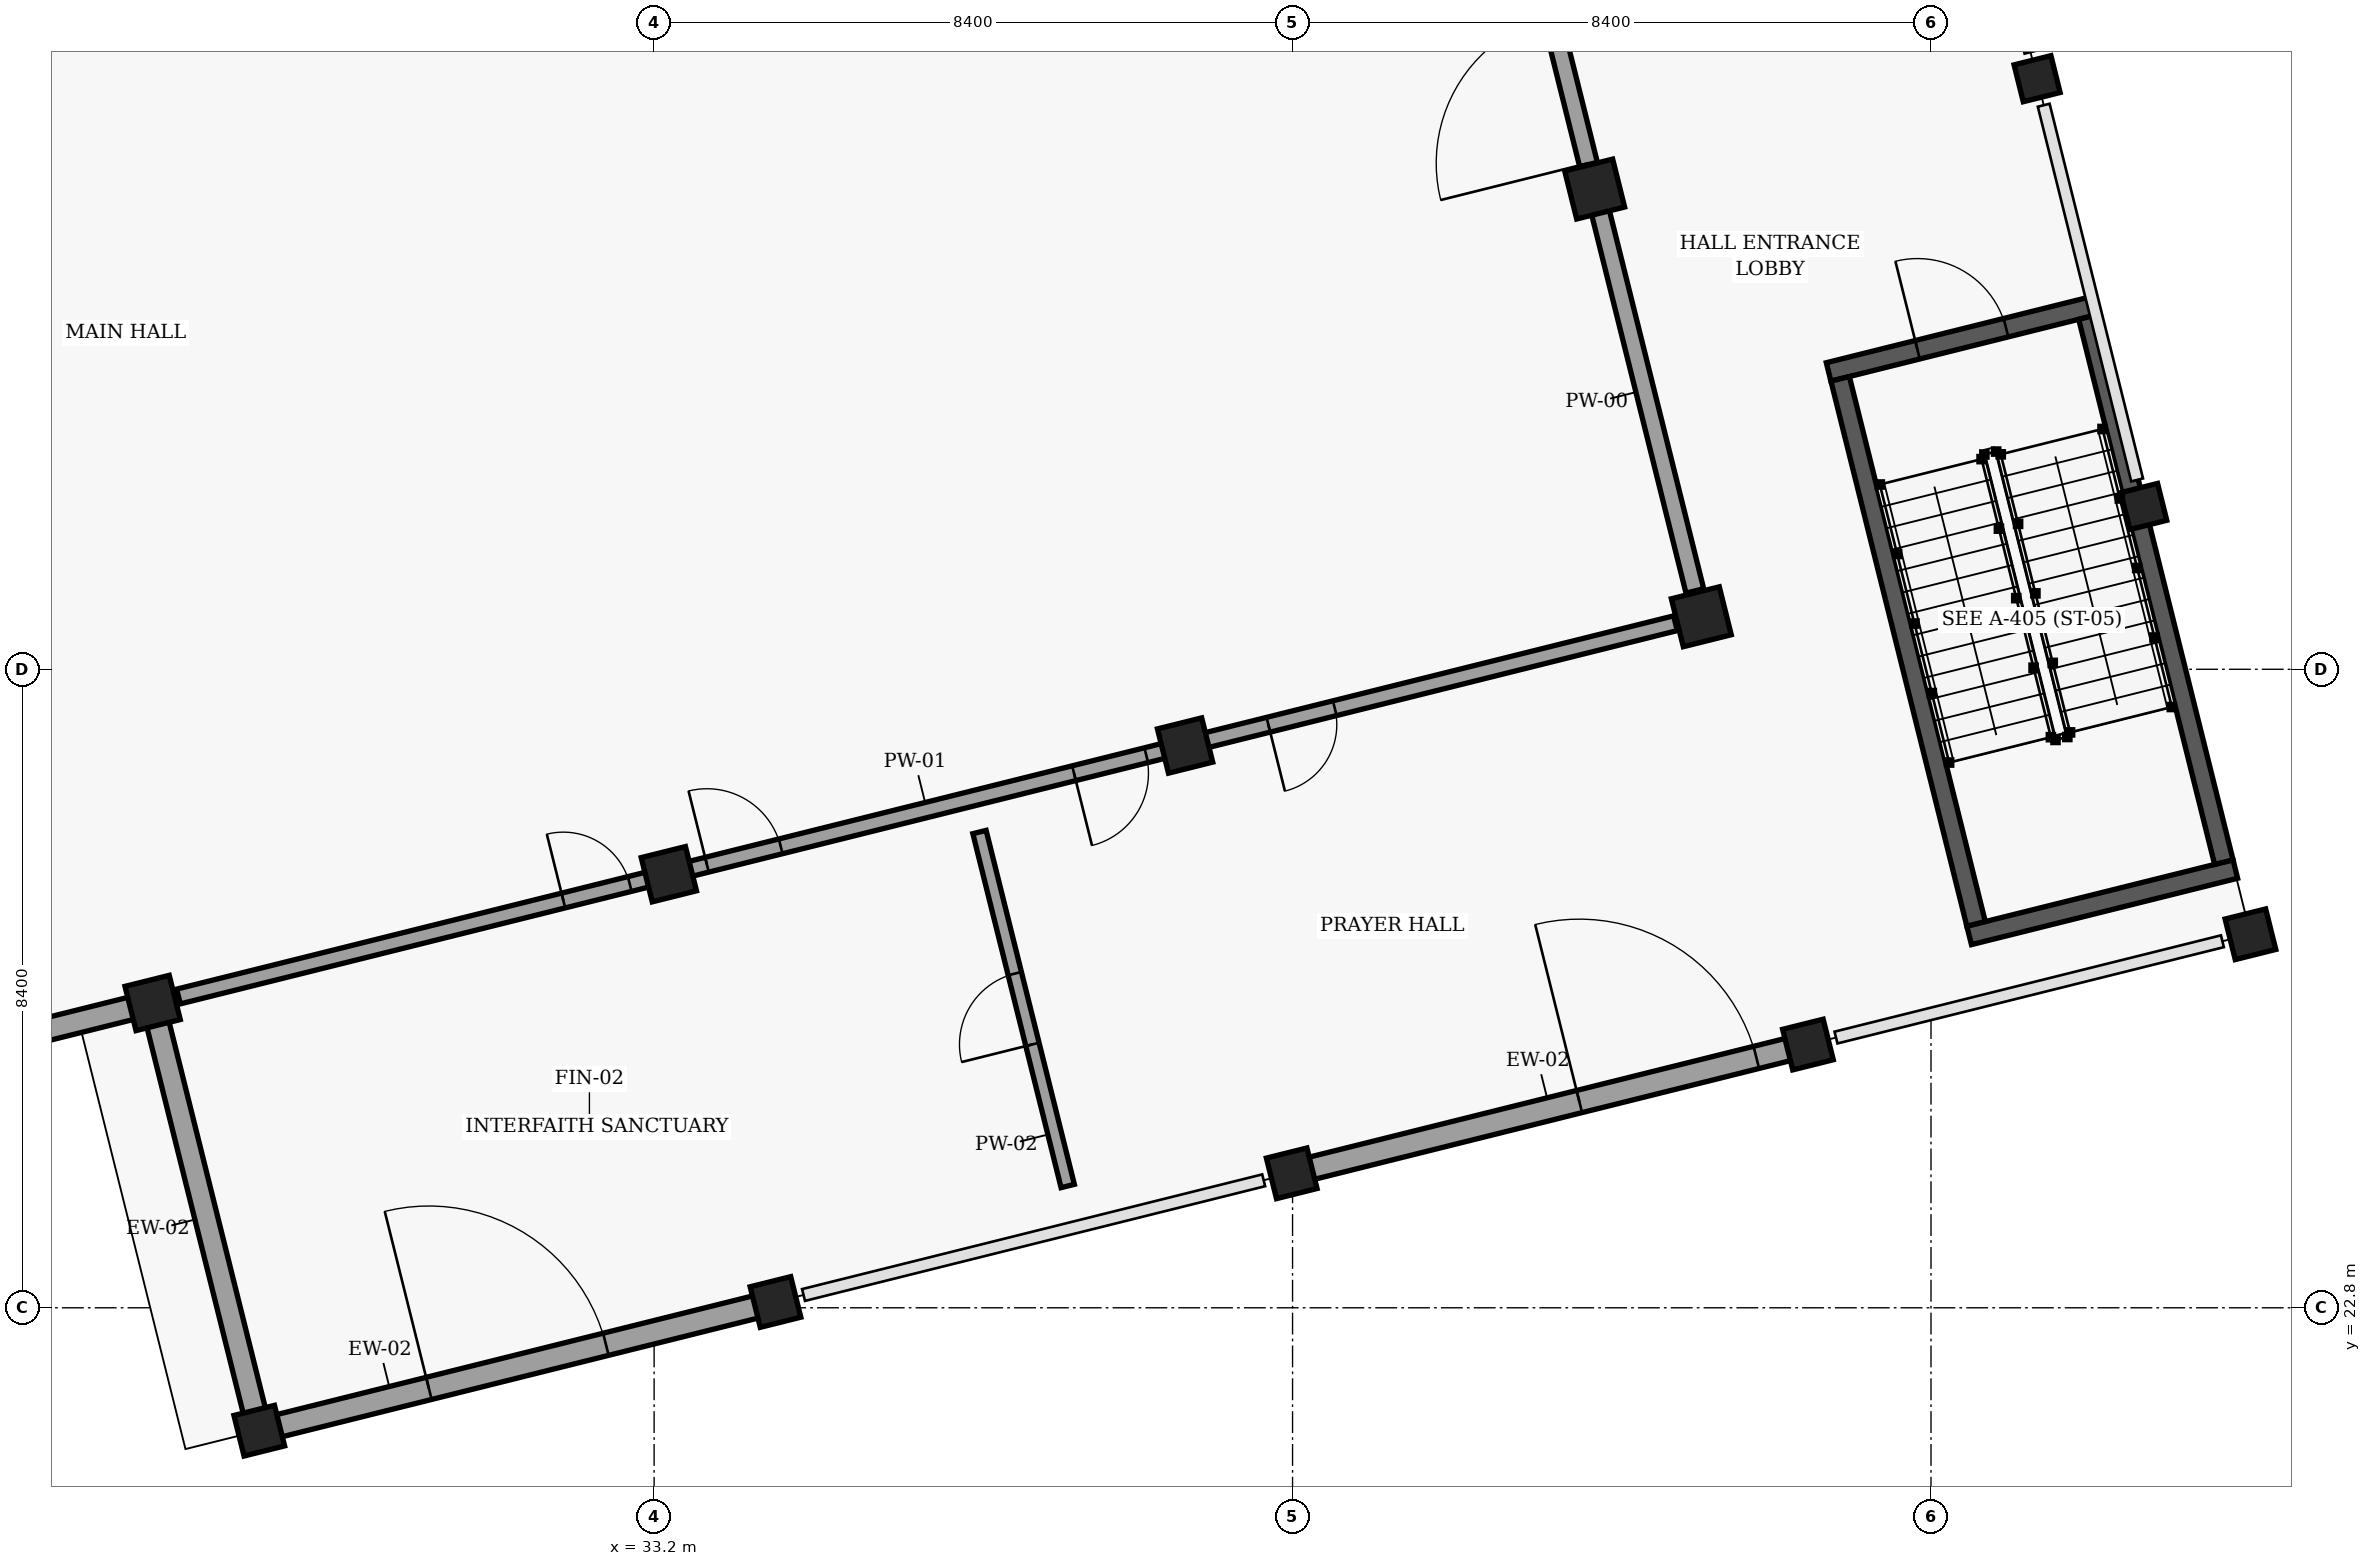
"""IFC4 building model, lengths in metres.
Left out: names, types, materials, properties, quantities, classifications, styles, units other than length and angle.
Written with IfcOpenShell. Run it as: python <this file> out.ifc"""

import sys

from ifc_helpers import new_model, si_unit, direction, frame, frame_2d, origin, origin_2d, place, context, subcontext, project, spatial, rectangle, extrude, element, fill, save


model = new_model("IFC4")
c1 = context("Model", 3, precision=1e-05, world=origin(), true_north=direction((0.0, 1.0)))
c2 = subcontext(c1, "Body", "Model", "MODEL_VIEW")
j1 = project(units=[si_unit("LENGTHUNIT", "METRE"), si_unit("PLANEANGLEUNIT", "RADIAN")], contexts=[c1])
p1 = place(None, origin())
s1 = spatial("IfcSite", under=j1, at=p1, CompositionType="ELEMENT")
p2 = place(p1, origin())
s2 = spatial("IfcBuilding", under=s1, at=p2, CompositionType="ELEMENT")
p3 = place(p2, origin())
s3 = spatial("IfcBuildingStorey", under=s2, at=p3, CompositionType="ELEMENT", Elevation=0.0)
for number, where, z_axis, x_axis in (
    (1, (46.978, 31.891, 0.0), (0.0, 0.0, 1.0), (0.97, 0.242, 0.0)),
    (2, (45.575, 37.518, 0.0), (0.0, 0.0, 1.0), (0.97, 0.242, 0.0)),
):
    element("IfcColumn", number, at=place(p3, frame(where, z_axis=z_axis, x_axis=x_axis)), inside=s3, PredefinedType="COLUMN", context=c2, shape_type="SweptSolid", body=[
        extrude(rectangle(XDim=0.65, YDim=0.65, at=origin_2d()), origin(), (0.0, 0.0, 1.0), 4.8),
    ])
for number, where, z_axis, x_axis in (
    (3, (52.799, 33.342, 0.0), (0.0, 0.0, 1.0), (0.97, 0.242, 0.0)),
    (4, (51.396, 38.97, 0.0), (0.0, 0.0, 1.0), (0.97, 0.242, 0.0)),
):
    element("IfcColumn", number, at=place(p3, frame(where, z_axis=z_axis, x_axis=x_axis)), inside=s3, PredefinedType="COLUMN", context=c2, shape_type="SweptSolid", body=[
        extrude(rectangle(XDim=0.5, YDim=0.5, at=origin_2d()), origin(), (0.0, 0.0, 1.0), 4.8),
    ])
for number, where, z_axis, x_axis in (
    (5, (28.005, 21.183, 0.0), (0.0, 0.0, 1.0), (0.97, 0.242, 0.0)),
    (6, (34.797, 22.876, 0.0), (0.0, 0.0, 1.0), (0.97, 0.242, 0.0)),
    (7, (41.589, 24.569, 0.0), (0.0, 0.0, 1.0), (0.97, 0.242, 0.0)),
    (8, (48.381, 26.263, 0.0), (0.0, 0.0, 1.0), (0.97, 0.242, 0.0)),
    (9, (54.203, 27.714, 0.0), (0.0, 0.0, 1.0), (0.97, 0.242, 0.0)),
):
    element("IfcColumn", number, at=place(p3, frame(where, z_axis=z_axis, x_axis=x_axis)), inside=s3, PredefinedType="COLUMN", context=c2, shape_type="SweptSolid", body=[
        extrude(rectangle(XDim=0.55, YDim=0.55, at=origin_2d()), origin(), (0.0, 0.0, 1.0), 4.8),
    ])
for number, where, z_axis, x_axis in (
    (10, (26.602, 26.81, 0.0), (0.0, 0.0, 1.0), (0.97, 0.242, 0.0)),
    (11, (33.394, 28.504, 0.0), (0.0, 0.0, 1.0), (0.97, 0.242, 0.0)),
    (12, (40.186, 30.197, 0.0), (0.0, 0.0, 1.0), (0.97, 0.242, 0.0)),
):
    element("IfcColumn", number, at=place(p3, frame(where, z_axis=z_axis, x_axis=x_axis)), inside=s3, PredefinedType="COLUMN", context=c2, shape_type="SweptSolid", body=[
        extrude(rectangle(XDim=0.6, YDim=0.6, at=origin_2d()), origin(), (0.0, 0.0, 1.0), 4.8),
    ])
p4 = place(p3, frame((28.102, 21.207, 0.0), z_axis=(0.0, 0.0, 1.0), x_axis=(0.970296478685, 0.241918877831, 0.0)))
e13 = element("IfcWall", 13, at=p4, inside=s3, PredefinedType="SOLIDWALL", context=c2, shape_type="SweptSolid", body=[
    extrude(rectangle(XDim=6.8, YDim=0.3, at=frame_2d((3.4, 0.0))), origin(), (0.0, 0.0, 1.0), 4.065),
])
p5 = place(p4, frame((2.2, 0.0, 0.0)))
e14 = element("IfcOpeningElement", 14, at=p5, cuts=e13, PredefinedType="OPENING", context=c2, shape_type="SweptSolid", body=[
    extrude(rectangle(XDim=2.4, YDim=2.4, at=frame_2d((1.2, 1.2))), frame((0.0, 0.16, 0.0), z_axis=(0.0, -1.0, 0.0), x_axis=(1.0, 0.0, 0.0)), (0.0, 0.0, 1.0), 0.32),
])
p6 = place(p3, frame((41.686, 24.594, 0.0), z_axis=(0.0, 0.0, 1.0), x_axis=(0.970296478685, 0.241918877831, 0.0)))
e15 = element("IfcWall", 15, at=p6, inside=s3, PredefinedType="SOLIDWALL", context=c2, shape_type="SweptSolid", body=[
    extrude(rectangle(XDim=6.8, YDim=0.3, at=frame_2d((3.4, 0.0))), origin(), (0.0, 0.0, 1.0), 4.065),
])
p7 = place(p6, frame((3.8, 0.0, 0.0)))
e16 = element("IfcOpeningElement", 16, at=p7, cuts=e15, PredefinedType="OPENING", context=c2, shape_type="SweptSolid", body=[
    extrude(rectangle(XDim=2.4, YDim=2.4, at=frame_2d((1.2, 1.2))), frame((0.0, 0.16, 0.0), z_axis=(0.0, -1.0, 0.0), x_axis=(1.0, 0.0, 0.0)), (0.0, 0.0, 1.0), 0.32),
])
p8 = place(p3, frame((27.986, 21.261, 0.0), z_axis=(0.0, 0.0, 1.0), x_axis=(-0.242077152267, 0.970257003247, 0.0)))
e17 = element("IfcWall", 17, at=p8, inside=s3, PredefinedType="SOLIDWALL", context=c2, shape_type="SweptSolid", body=[
    extrude(rectangle(XDim=5.639, YDim=0.3, at=frame_2d((2.819, 0.0))), origin(), (0.0, 0.0, 1.0), 4.095),
])
p9 = place(p3, frame((19.887, 25.136, 0.0), z_axis=(0.0, 0.0, 1.0), x_axis=(0.970287194641, 0.241956111549, 0.0)))
e18 = element("IfcWall", 18, at=p9, inside=s3, PredefinedType="SOLIDWALL", context=c2, shape_type="SweptSolid", body=[
    extrude(rectangle(XDim=6.84, YDim=0.3, at=frame_2d((3.42, 0.0))), origin(), (0.0, 0.0, 1.0), 4.085),
])
p10 = place(p3, frame((48.653, 35.112, 0.0), z_axis=(0.0, 0.0, 1.0), x_axis=(0.97025377679, 0.242090083699, 0.0)))
e19 = element("IfcWall", 19, at=p10, inside=s3, PredefinedType="SHEAR", context=c2, shape_type="SweptSolid", body=[
    extrude(rectangle(XDim=3.61, YDim=0.25, at=frame_2d((1.805, 0.0))), origin(), (0.0, 0.0, 1.0), 4.56),
])
p11 = place(p10, frame((1.205, 0.0, 0.0)))
e20 = element("IfcOpeningElement", 20, at=p11, cuts=e19, PredefinedType="OPENING", context=c2, shape_type="SweptSolid", body=[
    extrude(rectangle(XDim=1.2, YDim=2.15, at=frame_2d((0.6, 1.075))), frame((0.0, 0.135, 0.0), z_axis=(0.0, -1.0, 0.0), x_axis=(1.0, 0.0, 0.0)), (0.0, 0.0, 1.0), 0.27),
])
p12 = place(p3, frame((54.004, 28.572, 0.0), z_axis=(0.0, 0.0, 1.0), x_axis=(-0.970301456204, -0.241898912952, 0.0)))
e21 = element("IfcWall", 21, at=p12, inside=s3, PredefinedType="SHEAR", context=c2, shape_type="SweptSolid", body=[
    extrude(rectangle(XDim=3.609, YDim=0.25, at=frame_2d((1.805, 0.0))), origin(), (0.0, 0.0, 1.0), 4.56),
])
p13 = place(p3, frame((52.065, 35.834, 0.0), z_axis=(0.0, 0.0, 1.0), x_axis=(0.241944845077, -0.97029000404, 0.0)))
e22 = element("IfcWall", 22, at=p13, inside=s3, PredefinedType="SHEAR", context=c2, shape_type="SweptSolid", body=[
    extrude(rectangle(XDim=7.39, YDim=0.25, at=frame_2d((3.695, 0.0))), origin(), (0.0, 0.0, 1.0), 4.56),
])
p14 = place(p3, frame((50.593, 27.851, 0.0), z_axis=(0.0, 0.0, 1.0), x_axis=(-0.241975869228, 0.970282267544, 0.0)))
e23 = element("IfcWall", 23, at=p14, inside=s3, PredefinedType="SHEAR", context=c2, shape_type="SweptSolid", body=[
    extrude(rectangle(XDim=7.389, YDim=0.25, at=frame_2d((3.695, 0.0))), origin(), (0.0, 0.0, 1.0), 4.56),
])
p15 = place(p3, frame((46.893, 32.231, 0.0), z_axis=(0.0, 0.0, 1.0), x_axis=(-0.24195052599, 0.970288587469, 0.0)))
e24 = element("IfcWall", 24, at=p15, inside=s3, PredefinedType="PARTITIONING", context=c2, shape_type="SweptSolid", body=[
    extrude(rectangle(XDim=10.899, YDim=0.24, at=frame_2d((5.449, 0.0))), origin(), (0.0, 0.0, 1.0), 3.845),
])
p16 = place(p15, frame((5.799, 0.0, 0.0)))
e25 = element("IfcOpeningElement", 25, at=p16, cuts=e24, PredefinedType="OPENING", context=c2, shape_type="SweptSolid", body=[
    extrude(rectangle(XDim=2.0, YDim=2.3, at=frame_2d((1.0, 1.15))), frame((0.0, 0.13, 0.0), z_axis=(0.0, -1.0, 0.0), x_axis=(1.0, 0.0, 0.0)), (0.0, 0.0, 1.0), 0.26),
])
p17 = place(p3, frame((26.942, 26.895, 0.0), z_axis=(0.0, 0.0, 1.0), x_axis=(0.970294418067, 0.241927142478, 0.0)))
e26 = element("IfcWall", 26, at=p17, inside=s3, PredefinedType="PARTITIONING", context=c2, shape_type="SweptSolid", body=[
    extrude(rectangle(XDim=20.299, YDim=0.2, at=frame_2d((10.149, 0.0))), origin(), (0.0, 0.0, 1.0), 3.845),
])
p18 = place(p17, frame((7.166, 0.0, 0.0)))
e27 = element("IfcOpeningElement", 27, at=p18, cuts=e26, PredefinedType="OPENING", context=c2, shape_type="SweptSolid", body=[
    extrude(rectangle(XDim=1.0, YDim=2.14, at=frame_2d((0.5, 1.07))), frame((0.0, 0.11, 0.0), z_axis=(0.0, -1.0, 0.0), x_axis=(1.0, 0.0, 0.0)), (0.0, 0.0, 1.0), 0.22),
])
p19 = place(p17, frame((12.143, 0.0, 0.0)))
e28 = element("IfcOpeningElement", 28, at=p19, cuts=e26, PredefinedType="OPENING", context=c2, shape_type="SweptSolid", body=[
    extrude(rectangle(XDim=0.98, YDim=2.12, at=frame_2d((0.49, 1.06))), frame((0.0, 0.11, 0.0), z_axis=(0.0, -1.0, 0.0), x_axis=(1.0, 0.0, 0.0)), (0.0, 0.0, 1.0), 0.22),
])
p20 = place(p17, frame((5.219, 0.0, 0.0)))
e29 = element("IfcOpeningElement", 29, at=p20, cuts=e26, PredefinedType="OPENING", context=c2, shape_type="SweptSolid", body=[
    extrude(rectangle(XDim=0.9, YDim=2.06, at=frame_2d((0.45, 1.03))), frame((0.0, 0.11, 0.0), z_axis=(0.0, -1.0, 0.0), x_axis=(1.0, 0.0, 0.0)), (0.0, 0.0, 1.0), 0.22),
])
p21 = place(p17, frame((14.779, 0.0, 0.0)))
e30 = element("IfcOpeningElement", 30, at=p21, cuts=e26, PredefinedType="OPENING", context=c2, shape_type="SweptSolid", body=[
    extrude(rectangle(XDim=0.9, YDim=2.06, at=frame_2d((0.45, 1.03))), frame((0.0, 0.11, 0.0), z_axis=(0.0, -1.0, 0.0), x_axis=(1.0, 0.0, 0.0)), (0.0, 0.0, 1.0), 0.22),
])
p22 = place(p3, frame((38.642, 24.402, 0.0), z_axis=(0.0, 0.0, 1.0), x_axis=(-0.241925168697, 0.970294910195, 0.0)))
e31 = element("IfcWall", 31, at=p22, inside=s3, PredefinedType="PARTITIONING", context=c2, shape_type="SweptSolid", body=[
    extrude(rectangle(XDim=4.8, YDim=0.18, at=frame_2d((2.4, 0.0))), origin(), (0.0, 0.0, 1.0), 4.545),
])
p23 = place(p22, frame((1.92, 0.0, 0.0)))
e32 = element("IfcOpeningElement", 32, at=p23, cuts=e31, PredefinedType="OPENING", context=c2, shape_type="SweptSolid", body=[
    extrude(rectangle(XDim=0.96, YDim=2.08, at=frame_2d((0.48, 1.04))), frame((0.0, 0.1, 0.0), z_axis=(0.0, -1.0, 0.0), x_axis=(1.0, 0.0, 0.0)), (0.0, 0.0, 1.0), 0.2),
])
p24 = place(p11, origin())
e33 = element("IfcDoor", 33, at=p24, inside=s3, OperationType="SINGLE_SWING_LEFT", PredefinedType="DOOR", context=c2, shape_type="SweptSolid", body=[
    extrude(rectangle(XDim=1.2, YDim=2.15, at=frame_2d((0.6, 1.075))), frame((0.0, 0.025, 0.0), z_axis=(0.0, -1.0, 0.0), x_axis=(1.0, 0.0, 0.0)), (0.0, 0.0, 1.0), 0.05),
])
fill(e20, e33)
p25 = place(p5, origin())
e34 = element("IfcDoor", 34, at=p25, inside=s3, OperationType="DOUBLE_DOOR_SINGLE_SWING", PredefinedType="DOOR", context=c2, shape_type="SweptSolid", body=[
    extrude(rectangle(XDim=2.4, YDim=2.4, at=frame_2d((1.2, 1.2))), frame((0.0, 0.025, 0.0), z_axis=(0.0, -1.0, 0.0), x_axis=(1.0, 0.0, 0.0)), (0.0, 0.0, 1.0), 0.05),
])
fill(e14, e34)
p26 = place(p7, origin())
e35 = element("IfcDoor", 35, at=p26, inside=s3, OperationType="DOUBLE_DOOR_SINGLE_SWING", PredefinedType="DOOR", context=c2, shape_type="SweptSolid", body=[
    extrude(rectangle(XDim=2.4, YDim=2.4, at=frame_2d((1.2, 1.2))), frame((0.0, 0.025, 0.0), z_axis=(0.0, -1.0, 0.0), x_axis=(1.0, 0.0, 0.0)), (0.0, 0.0, 1.0), 0.05),
])
fill(e16, e35)
p27 = place(p16, origin())
e36 = element("IfcDoor", 36, at=p27, inside=s3, OperationType="DOUBLE_DOOR_SINGLE_SWING", PredefinedType="DOOR", context=c2, shape_type="SweptSolid", body=[
    extrude(rectangle(XDim=2.0, YDim=2.3, at=frame_2d((1.0, 1.15))), frame((0.0, 0.025, 0.0), z_axis=(0.0, -1.0, 0.0), x_axis=(1.0, 0.0, 0.0)), (0.0, 0.0, 1.0), 0.05),
])
fill(e25, e36)
p28 = place(p18, origin())
e37 = element("IfcDoor", 37, at=p28, inside=s3, OperationType="SINGLE_SWING_LEFT", PredefinedType="DOOR", context=c2, shape_type="SweptSolid", body=[
    extrude(rectangle(XDim=1.0, YDim=2.14, at=frame_2d((0.5, 1.07))), frame((0.0, 0.025, 0.0), z_axis=(0.0, -1.0, 0.0), x_axis=(1.0, 0.0, 0.0)), (0.0, 0.0, 1.0), 0.05),
])
fill(e27, e37)
p29 = place(p19, origin())
e38 = element("IfcDoor", 38, at=p29, inside=s3, OperationType="SINGLE_SWING_RIGHT", PredefinedType="DOOR", context=c2, shape_type="SweptSolid", body=[
    extrude(rectangle(XDim=0.98, YDim=2.12, at=frame_2d((0.49, 1.06))), frame((0.0, 0.025, 0.0), z_axis=(0.0, -1.0, 0.0), x_axis=(1.0, 0.0, 0.0)), (0.0, 0.0, 1.0), 0.05),
])
fill(e28, e38)
p30 = place(p23, origin())
e39 = element("IfcDoor", 39, at=p30, inside=s3, OperationType="SINGLE_SWING_LEFT", PredefinedType="DOOR", context=c2, shape_type="SweptSolid", body=[
    extrude(rectangle(XDim=0.96, YDim=2.08, at=frame_2d((0.48, 1.04))), frame((0.0, 0.025, 0.0), z_axis=(0.0, -1.0, 0.0), x_axis=(1.0, 0.0, 0.0)), (0.0, 0.0, 1.0), 0.05),
])
fill(e32, e39)
p31 = place(p20, origin())
e40 = element("IfcDoor", 40, at=p31, inside=s3, OperationType="SINGLE_SWING_LEFT", PredefinedType="DOOR", context=c2, shape_type="SweptSolid", body=[
    extrude(rectangle(XDim=0.9, YDim=2.06, at=frame_2d((0.45, 1.03))), frame((0.0, 0.025, 0.0), z_axis=(0.0, -1.0, 0.0), x_axis=(1.0, 0.0, 0.0)), (0.0, 0.0, 1.0), 0.05),
])
fill(e29, e40)
p32 = place(p21, origin())
e41 = element("IfcDoor", 41, at=p32, inside=s3, OperationType="SINGLE_SWING_RIGHT", PredefinedType="DOOR", context=c2, shape_type="SweptSolid", body=[
    extrude(rectangle(XDim=0.9, YDim=2.06, at=frame_2d((0.45, 1.03))), frame((0.0, 0.025, 0.0), z_axis=(0.0, -1.0, 0.0), x_axis=(1.0, 0.0, 0.0)), (0.0, 0.0, 1.0), 0.05),
])
fill(e30, e41)
save(model, sys.argv[1])
